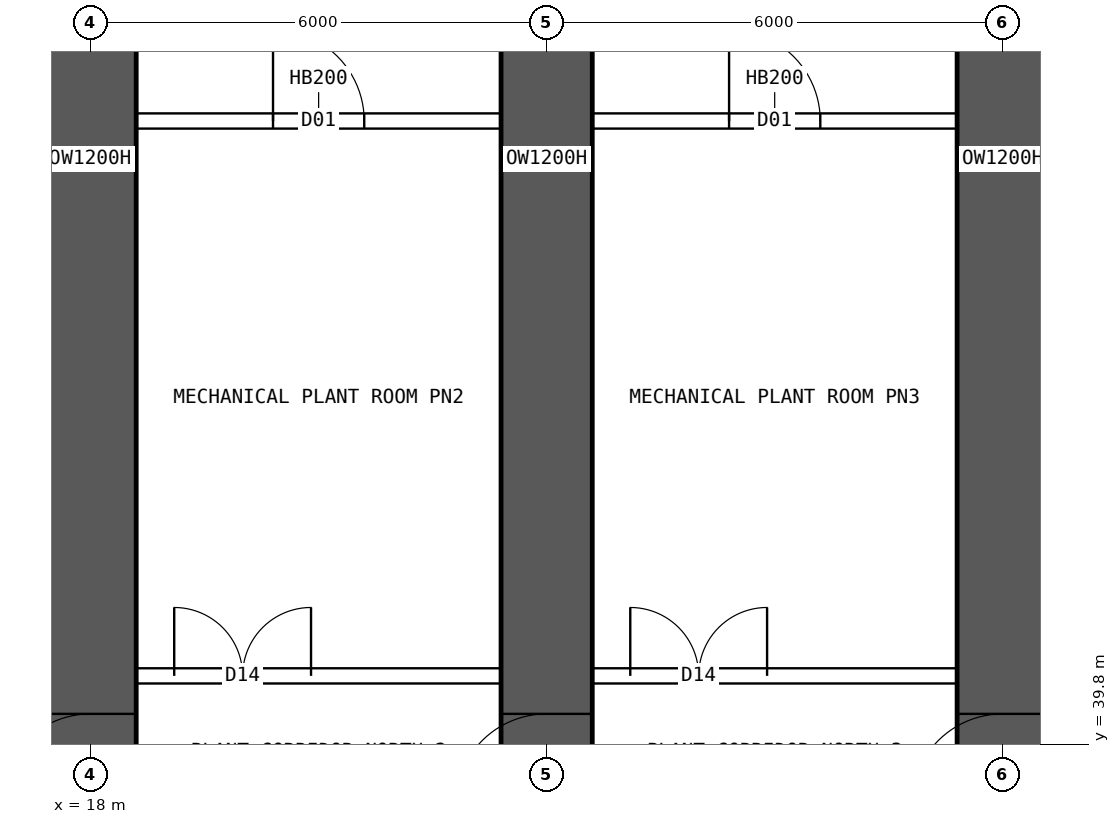
"""IFC4 building model, lengths in metres.
Left out: names, types, materials, properties, quantities, classifications, styles, units other than length and angle.
Written with IfcOpenShell. Run it as: python <this file> out.ifc"""

import sys

from ifc_helpers import new_model, si_unit, direction, frame, frame_2d, origin, place, context, subcontext, project, spatial, rectangle, extrude, element, fill, save


model = new_model("IFC4")
c1 = context("Model", 3, precision=1e-05, world=origin(), true_north=direction((0.0, 1.0)))
c2 = subcontext(c1, "Body", "Model", "MODEL_VIEW")
j1 = project(units=[si_unit("LENGTHUNIT", "METRE"), si_unit("PLANEANGLEUNIT", "RADIAN")], contexts=[c1])
p1 = place(None, origin())
s1 = spatial("IfcSite", under=j1, at=p1, CompositionType="ELEMENT")
p2 = place(p1, origin())
s2 = spatial("IfcBuilding", under=s1, at=p2, CompositionType="ELEMENT")
p3 = place(p2, frame((0.0, 0.0, 68.95)))
s3 = spatial("IfcBuildingStorey", under=s2, at=p3, CompositionType="ELEMENT", Elevation=68.95)
p4 = place(p3, frame((18.0, 38.7, 0.0), z_axis=(0.0, 0.0, 1.0), x_axis=(0.0, 1.0, 0.0)))
e1 = element("IfcWall", 1, at=p4, inside=s3, PredefinedType="SHEAR", context=c2, shape_type="SweptSolid", body=[
    extrude(rectangle(XDim=17.6, YDim=1.2, at=frame_2d((8.8, 0.0))), origin(), (0.0, 0.0, 1.0), 7.2),
])
p5 = place(p4, frame((0.3, 0.0, 0.0)))
e2 = element("IfcOpeningElement", 2, at=p5, cuts=e1, PredefinedType="OPENING", context=c2, shape_type="SweptSolid", body=[
    extrude(rectangle(XDim=1.2, YDim=2.1, at=frame_2d((0.6, 1.05))), frame((0.0, 0.61, 0.0), z_axis=(0.0, -1.0, 0.0), x_axis=(1.0, 0.0, 0.0)), (0.0, 0.0, 1.0), 1.22),
])
p6 = place(p3, frame((24.0, 38.7, 0.0), z_axis=(0.0, 0.0, 1.0), x_axis=(0.0, 1.0, 0.0)))
e3 = element("IfcWall", 3, at=p6, inside=s3, PredefinedType="SHEAR", context=c2, shape_type="SweptSolid", body=[
    extrude(rectangle(XDim=17.6, YDim=1.2, at=frame_2d((8.8, 0.0))), origin(), (0.0, 0.0, 1.0), 7.2),
])
p7 = place(p6, frame((0.3, 0.0, 0.0)))
e4 = element("IfcOpeningElement", 4, at=p7, cuts=e3, PredefinedType="OPENING", context=c2, shape_type="SweptSolid", body=[
    extrude(rectangle(XDim=1.2, YDim=2.1, at=frame_2d((0.6, 1.05))), frame((0.0, 0.61, 0.0), z_axis=(0.0, -1.0, 0.0), x_axis=(1.0, 0.0, 0.0)), (0.0, 0.0, 1.0), 1.22),
])
p8 = place(p3, frame((30.0, 38.7, 0.0), z_axis=(0.0, 0.0, 1.0), x_axis=(0.0, 1.0, 0.0)))
e5 = element("IfcWall", 5, at=p8, inside=s3, PredefinedType="SHEAR", context=c2, shape_type="SweptSolid", body=[
    extrude(rectangle(XDim=17.6, YDim=1.2, at=frame_2d((8.8, 0.0))), origin(), (0.0, 0.0, 1.0), 7.2),
])
p9 = place(p8, frame((0.3, 0.0, 0.0)))
e6 = element("IfcOpeningElement", 6, at=p9, cuts=e5, PredefinedType="OPENING", context=c2, shape_type="SweptSolid", body=[
    extrude(rectangle(XDim=1.2, YDim=2.1, at=frame_2d((0.6, 1.05))), frame((0.0, 0.61, 0.0), z_axis=(0.0, -1.0, 0.0), x_axis=(1.0, 0.0, 0.0)), (0.0, 0.0, 1.0), 1.22),
])
p10 = place(p3, frame((15.6, 40.7, 0.0), z_axis=(0.0, 0.0, 1.0), x_axis=(1.0, 0.0, 0.0)))
e7 = element("IfcWall", 7, at=p10, inside=s3, PredefinedType="SOLIDWALL", context=c2, shape_type="SweptSolid", body=[
    extrude(rectangle(XDim=52.8, YDim=0.2, at=frame_2d((26.4, 0.0))), origin(), (0.0, 0.0, 1.0), 6.9),
])
p11 = place(p10, frame((0.6, 0.0, 0.0)))
e8 = element("IfcOpeningElement", 8, at=p11, cuts=e7, PredefinedType="OPENING", context=c2, shape_type="SweptSolid", body=[
    extrude(rectangle(XDim=1.2, YDim=2.1, at=frame_2d((0.6, 1.05))), frame((0.0, 0.11, 0.0), z_axis=(0.0, -1.0, 0.0), x_axis=(1.0, 0.0, 0.0)), (0.0, 0.0, 1.0), 0.22),
])
p12 = place(p10, frame((3.5, 0.0, 0.0)))
e9 = element("IfcOpeningElement", 9, at=p12, cuts=e7, PredefinedType="OPENING", context=c2, shape_type="SweptSolid", body=[
    extrude(rectangle(XDim=1.8, YDim=2.4, at=frame_2d((0.9, 1.2))), frame((0.0, 0.11, 0.0), z_axis=(0.0, -1.0, 0.0), x_axis=(1.0, 0.0, 0.0)), (0.0, 0.0, 1.0), 0.22),
])
p13 = place(p10, frame((9.5, 0.0, 0.0)))
e10 = element("IfcOpeningElement", 10, at=p13, cuts=e7, PredefinedType="OPENING", context=c2, shape_type="SweptSolid", body=[
    extrude(rectangle(XDim=1.8, YDim=2.4, at=frame_2d((0.9, 1.2))), frame((0.0, 0.11, 0.0), z_axis=(0.0, -1.0, 0.0), x_axis=(1.0, 0.0, 0.0)), (0.0, 0.0, 1.0), 0.22),
])
p14 = place(p10, frame((15.5, 0.0, 0.0)))
e11 = element("IfcOpeningElement", 11, at=p14, cuts=e7, PredefinedType="OPENING", context=c2, shape_type="SweptSolid", body=[
    extrude(rectangle(XDim=1.8, YDim=2.4, at=frame_2d((0.9, 1.2))), frame((0.0, 0.11, 0.0), z_axis=(0.0, -1.0, 0.0), x_axis=(1.0, 0.0, 0.0)), (0.0, 0.0, 1.0), 0.22),
])
p15 = place(p10, frame((21.5, 0.0, 0.0)))
e12 = element("IfcOpeningElement", 12, at=p15, cuts=e7, PredefinedType="OPENING", context=c2, shape_type="SweptSolid", body=[
    extrude(rectangle(XDim=1.8, YDim=2.4, at=frame_2d((0.9, 1.2))), frame((0.0, 0.11, 0.0), z_axis=(0.0, -1.0, 0.0), x_axis=(1.0, 0.0, 0.0)), (0.0, 0.0, 1.0), 0.22),
])
p16 = place(p10, frame((27.5, 0.0, 0.0)))
e13 = element("IfcOpeningElement", 13, at=p16, cuts=e7, PredefinedType="OPENING", context=c2, shape_type="SweptSolid", body=[
    extrude(rectangle(XDim=1.8, YDim=2.4, at=frame_2d((0.9, 1.2))), frame((0.0, 0.11, 0.0), z_axis=(0.0, -1.0, 0.0), x_axis=(1.0, 0.0, 0.0)), (0.0, 0.0, 1.0), 0.22),
])
p17 = place(p10, frame((33.5, 0.0, 0.0)))
e14 = element("IfcOpeningElement", 14, at=p17, cuts=e7, PredefinedType="OPENING", context=c2, shape_type="SweptSolid", body=[
    extrude(rectangle(XDim=1.8, YDim=2.4, at=frame_2d((0.9, 1.2))), frame((0.0, 0.11, 0.0), z_axis=(0.0, -1.0, 0.0), x_axis=(1.0, 0.0, 0.0)), (0.0, 0.0, 1.0), 0.22),
])
p18 = place(p10, frame((39.5, 0.0, 0.0)))
e15 = element("IfcOpeningElement", 15, at=p18, cuts=e7, PredefinedType="OPENING", context=c2, shape_type="SweptSolid", body=[
    extrude(rectangle(XDim=1.8, YDim=2.4, at=frame_2d((0.9, 1.2))), frame((0.0, 0.11, 0.0), z_axis=(0.0, -1.0, 0.0), x_axis=(1.0, 0.0, 0.0)), (0.0, 0.0, 1.0), 0.22),
])
p19 = place(p10, frame((45.5, 0.0, 0.0)))
e16 = element("IfcOpeningElement", 16, at=p19, cuts=e7, PredefinedType="OPENING", context=c2, shape_type="SweptSolid", body=[
    extrude(rectangle(XDim=1.8, YDim=2.4, at=frame_2d((0.9, 1.2))), frame((0.0, 0.11, 0.0), z_axis=(0.0, -1.0, 0.0), x_axis=(1.0, 0.0, 0.0)), (0.0, 0.0, 1.0), 0.22),
])
p20 = place(p10, frame((51.5, 0.0, 0.0)))
e17 = element("IfcOpeningElement", 17, at=p20, cuts=e7, PredefinedType="OPENING", context=c2, shape_type="SweptSolid", body=[
    extrude(rectangle(XDim=1.2, YDim=2.1, at=frame_2d((0.6, 1.05))), frame((0.0, 0.11, 0.0), z_axis=(0.0, -1.0, 0.0), x_axis=(1.0, 0.0, 0.0)), (0.0, 0.0, 1.0), 0.22),
])
p21 = place(p3, frame((18.5, 48.0, 0.0), z_axis=(0.0, 0.0, 1.0), x_axis=(1.0, 0.0, 0.0)))
e18 = element("IfcWall", 18, at=p21, inside=s3, PredefinedType="SOLIDWALL", context=c2, shape_type="SweptSolid", body=[
    extrude(rectangle(XDim=5.0, YDim=0.2, at=frame_2d((2.5, 0.0))), origin(), (0.0, 0.0, 1.0), 6.9),
])
p22 = place(p21, frame((1.9, 0.0, 0.0)))
e19 = element("IfcOpeningElement", 19, at=p22, cuts=e18, PredefinedType="OPENING", context=c2, shape_type="SweptSolid", body=[
    extrude(rectangle(XDim=1.2, YDim=2.1, at=frame_2d((0.6, 1.05))), frame((0.0, 0.11, 0.0), z_axis=(0.0, -1.0, 0.0), x_axis=(1.0, 0.0, 0.0)), (0.0, 0.0, 1.0), 0.22),
])
p23 = place(p3, frame((24.5, 48.0, 0.0), z_axis=(0.0, 0.0, 1.0), x_axis=(1.0, 0.0, 0.0)))
e20 = element("IfcWall", 20, at=p23, inside=s3, PredefinedType="SOLIDWALL", context=c2, shape_type="SweptSolid", body=[
    extrude(rectangle(XDim=5.0, YDim=0.2, at=frame_2d((2.5, 0.0))), origin(), (0.0, 0.0, 1.0), 6.9),
])
p24 = place(p23, frame((1.9, 0.0, 0.0)))
e21 = element("IfcOpeningElement", 21, at=p24, cuts=e20, PredefinedType="OPENING", context=c2, shape_type="SweptSolid", body=[
    extrude(rectangle(XDim=1.2, YDim=2.1, at=frame_2d((0.6, 1.05))), frame((0.0, 0.11, 0.0), z_axis=(0.0, -1.0, 0.0), x_axis=(1.0, 0.0, 0.0)), (0.0, 0.0, 1.0), 0.22),
])
p25 = place(p22, origin())
e22 = element("IfcDoor", 22, at=p25, inside=s3, OperationType="SINGLE_SWING_LEFT", PredefinedType="DOOR", context=c2, shape_type="SweptSolid", body=[
    extrude(rectangle(XDim=1.2, YDim=2.1, at=frame_2d((0.6, 1.05))), frame((0.0, 0.025, 0.0), z_axis=(0.0, -1.0, 0.0), x_axis=(1.0, 0.0, 0.0)), (0.0, 0.0, 1.0), 0.05),
])
fill(e19, e22)
p26 = place(p24, origin())
e23 = element("IfcDoor", 23, at=p26, inside=s3, OperationType="SINGLE_SWING_LEFT", PredefinedType="DOOR", context=c2, shape_type="SweptSolid", body=[
    extrude(rectangle(XDim=1.2, YDim=2.1, at=frame_2d((0.6, 1.05))), frame((0.0, 0.025, 0.0), z_axis=(0.0, -1.0, 0.0), x_axis=(1.0, 0.0, 0.0)), (0.0, 0.0, 1.0), 0.05),
])
fill(e21, e23)
p27 = place(p12, origin())
e24 = element("IfcDoor", 24, at=p27, inside=s3, OperationType="DOUBLE_DOOR_SINGLE_SWING", PredefinedType="DOOR", context=c2, shape_type="SweptSolid", body=[
    extrude(rectangle(XDim=1.8, YDim=2.4, at=frame_2d((0.9, 1.2))), frame((0.0, 0.025, 0.0), z_axis=(0.0, -1.0, 0.0), x_axis=(1.0, 0.0, 0.0)), (0.0, 0.0, 1.0), 0.05),
])
fill(e9, e24)
p28 = place(p13, origin())
e25 = element("IfcDoor", 25, at=p28, inside=s3, OperationType="DOUBLE_DOOR_SINGLE_SWING", PredefinedType="DOOR", context=c2, shape_type="SweptSolid", body=[
    extrude(rectangle(XDim=1.8, YDim=2.4, at=frame_2d((0.9, 1.2))), frame((0.0, 0.025, 0.0), z_axis=(0.0, -1.0, 0.0), x_axis=(1.0, 0.0, 0.0)), (0.0, 0.0, 1.0), 0.05),
])
fill(e10, e25)
p29 = place(p5, origin())
e26 = element("IfcDoor", 26, at=p29, inside=s3, OperationType="SINGLE_SWING_LEFT", PredefinedType="DOOR", context=c2, shape_type="SweptSolid", body=[
    extrude(rectangle(XDim=1.2, YDim=2.1, at=frame_2d((0.6, 1.05))), frame((0.0, 0.025, 0.0), z_axis=(0.0, -1.0, 0.0), x_axis=(1.0, 0.0, 0.0)), (0.0, 0.0, 1.0), 0.05),
])
fill(e2, e26)
p30 = place(p7, origin())
e27 = element("IfcDoor", 27, at=p30, inside=s3, OperationType="SINGLE_SWING_LEFT", PredefinedType="DOOR", context=c2, shape_type="SweptSolid", body=[
    extrude(rectangle(XDim=1.2, YDim=2.1, at=frame_2d((0.6, 1.05))), frame((0.0, 0.025, 0.0), z_axis=(0.0, -1.0, 0.0), x_axis=(1.0, 0.0, 0.0)), (0.0, 0.0, 1.0), 0.05),
])
fill(e4, e27)
p31 = place(p9, origin())
e28 = element("IfcDoor", 28, at=p31, inside=s3, OperationType="SINGLE_SWING_LEFT", PredefinedType="DOOR", context=c2, shape_type="SweptSolid", body=[
    extrude(rectangle(XDim=1.2, YDim=2.1, at=frame_2d((0.6, 1.05))), frame((0.0, 0.025, 0.0), z_axis=(0.0, -1.0, 0.0), x_axis=(1.0, 0.0, 0.0)), (0.0, 0.0, 1.0), 0.05),
])
fill(e6, e28)
save(model, sys.argv[1])
